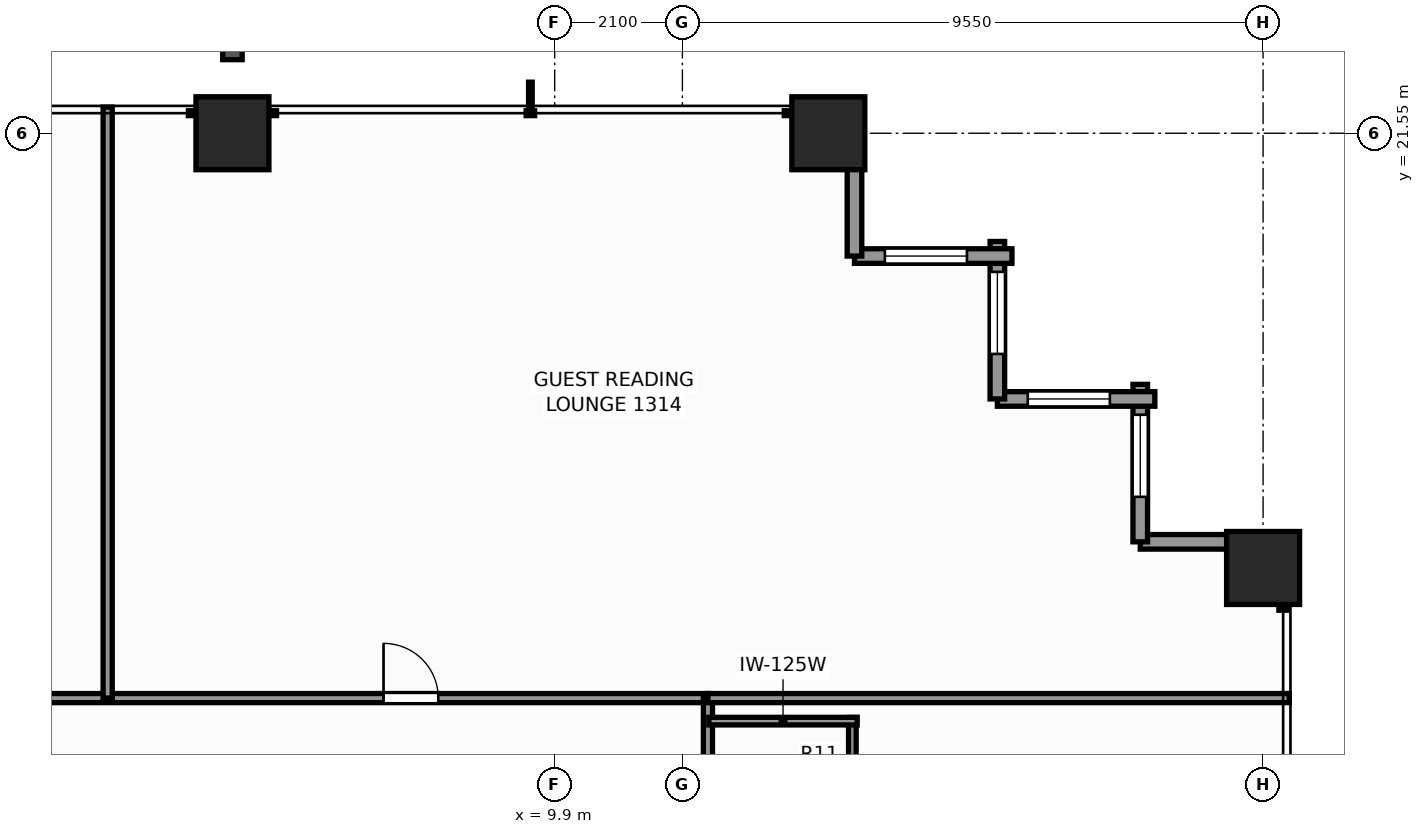
"""IFC4 building model, lengths in metres.
Left out: names, types, materials, properties, quantities, classifications, styles, units other than length and angle.
Written with IfcOpenShell. Run it as: python <this file> out.ifc"""

import sys

from ifc_helpers import new_model, si_unit, direction, frame, frame_2d, origin, origin_2d, place, context, subcontext, project, spatial, rectangle, extrude, element, fill, save


model = new_model("IFC4")
c1 = context("Model", 3, precision=1e-05, world=origin(), true_north=direction((0.0, 1.0)))
c2 = subcontext(c1, "Body", "Model", "MODEL_VIEW")
j1 = project(units=[si_unit("LENGTHUNIT", "METRE"), si_unit("PLANEANGLEUNIT", "RADIAN")], contexts=[c1])
p1 = place(None, origin())
s1 = spatial("IfcSite", under=j1, at=p1, CompositionType="ELEMENT")
p2 = place(p1, origin())
s2 = spatial("IfcBuilding", under=s1, at=p2, CompositionType="ELEMENT")
p3 = place(p2, frame((0.0, 0.0, 46.9)))
s3 = spatial("IfcBuildingStorey", under=s2, at=p3, CompositionType="ELEMENT", Elevation=46.9)
for number, where, z_axis, x_axis in (
    (1, (4.6, 21.55, 0.0), (0.0, 0.0, 1.0), (1.0, 0.0, 0.0)),
    (2, (14.4, 21.55, 0.0), (0.0, 0.0, 1.0), (1.0, 0.0, 0.0)),
    (3, (21.55, 14.4, 0.0), (0.0, 0.0, 1.0), (1.0, 0.0, 0.0)),
):
    element("IfcColumn", number, at=place(p3, frame(where, z_axis=z_axis, x_axis=x_axis)), inside=s3, PredefinedType="COLUMN", context=c2, shape_type="SweptSolid", body=[
        extrude(rectangle(XDim=1.2, YDim=1.2, at=origin_2d()), origin(), (0.0, 0.0, 1.0), 3.3),
    ])
p4 = place(p3, frame((19.53, 14.83, 0.0), z_axis=(0.0, 0.0, 1.0), x_axis=(1.0, 0.0, 0.0)))
e4 = element("IfcWall", 4, at=p4, inside=s3, PredefinedType="STANDARD", context=c2, shape_type="SweptSolid", body=[
    extrude(rectangle(XDim=2.59, YDim=0.24, at=frame_2d((1.295, 0.0))), origin(), (0.0, 0.0, 1.0), 2.439),
])
p5 = place(p3, frame((19.53, 17.42, 0.0), z_axis=(0.0, 0.0, 1.0), x_axis=(0.0, -1.0, 0.0)))
e5 = element("IfcWall", 5, at=p5, inside=s3, PredefinedType="STANDARD", context=c2, shape_type="SweptSolid", body=[
    extrude(rectangle(XDim=2.59, YDim=0.24, at=frame_2d((1.295, 0.0))), origin(), (0.0, 0.0, 1.0), 2.439),
])
p6 = place(p5, frame((0.5, 0.0, 0.65)))
e6 = element("IfcOpeningElement", 6, at=p6, cuts=e5, PredefinedType="OPENING", context=c2, shape_type="SweptSolid", body=[
    extrude(rectangle(XDim=1.35, YDim=1.55, at=frame_2d((0.675, 0.775))), frame((0.0, 0.13, 0.0), z_axis=(0.0, -1.0, 0.0), x_axis=(1.0, 0.0, 0.0)), (0.0, 0.0, 1.0), 0.26),
])
p7 = place(p3, frame((17.18, 17.18, 0.0), z_axis=(0.0, 0.0, 1.0), x_axis=(1.0, 0.0, 0.0)))
e7 = element("IfcWall", 7, at=p7, inside=s3, PredefinedType="STANDARD", context=c2, shape_type="SweptSolid", body=[
    extrude(rectangle(XDim=2.59, YDim=0.24, at=frame_2d((1.295, 0.0))), origin(), (0.0, 0.0, 1.0), 2.439),
])
p8 = place(p7, frame((0.5, 0.0, 0.65)))
e8 = element("IfcOpeningElement", 8, at=p8, cuts=e7, PredefinedType="OPENING", context=c2, shape_type="SweptSolid", body=[
    extrude(rectangle(XDim=1.35, YDim=1.55, at=frame_2d((0.675, 0.775))), frame((0.0, 0.13, 0.0), z_axis=(0.0, -1.0, 0.0), x_axis=(1.0, 0.0, 0.0)), (0.0, 0.0, 1.0), 0.26),
])
p9 = place(p3, frame((17.18, 19.77, 0.0), z_axis=(0.0, 0.0, 1.0), x_axis=(0.0, -1.0, 0.0)))
e9 = element("IfcWall", 9, at=p9, inside=s3, PredefinedType="STANDARD", context=c2, shape_type="SweptSolid", body=[
    extrude(rectangle(XDim=2.59, YDim=0.24, at=frame_2d((1.295, 0.0))), origin(), (0.0, 0.0, 1.0), 2.439),
])
p10 = place(p9, frame((0.5, 0.0, 0.65)))
e10 = element("IfcOpeningElement", 10, at=p10, cuts=e9, PredefinedType="OPENING", context=c2, shape_type="SweptSolid", body=[
    extrude(rectangle(XDim=1.35, YDim=1.55, at=frame_2d((0.675, 0.775))), frame((0.0, 0.13, 0.0), z_axis=(0.0, -1.0, 0.0), x_axis=(1.0, 0.0, 0.0)), (0.0, 0.0, 1.0), 0.26),
])
p11 = place(p3, frame((14.83, 19.53, 0.0), z_axis=(0.0, 0.0, 1.0), x_axis=(1.0, 0.0, 0.0)))
e11 = element("IfcWall", 11, at=p11, inside=s3, PredefinedType="STANDARD", context=c2, shape_type="SweptSolid", body=[
    extrude(rectangle(XDim=2.59, YDim=0.24, at=frame_2d((1.295, 0.0))), origin(), (0.0, 0.0, 1.0), 2.439),
])
p12 = place(p11, frame((0.5, 0.0, 0.65)))
e12 = element("IfcOpeningElement", 12, at=p12, cuts=e11, PredefinedType="OPENING", context=c2, shape_type="SweptSolid", body=[
    extrude(rectangle(XDim=1.35, YDim=1.55, at=frame_2d((0.675, 0.775))), frame((0.0, 0.13, 0.0), z_axis=(0.0, -1.0, 0.0), x_axis=(1.0, 0.0, 0.0)), (0.0, 0.0, 1.0), 0.26),
])
p13 = place(p3, frame((14.83, 22.12, 0.0), z_axis=(0.0, 0.0, 1.0), x_axis=(0.0, -1.0, 0.0)))
e13 = element("IfcWall", 13, at=p13, inside=s3, PredefinedType="STANDARD", context=c2, shape_type="SweptSolid", body=[
    extrude(rectangle(XDim=2.59, YDim=0.24, at=frame_2d((1.295, 0.0))), origin(), (0.0, 0.0, 1.0), 2.439),
])
p14 = place(p3, frame((-12.58, 12.26, 0.0), z_axis=(0.0, 0.0, 1.0), x_axis=(1.0, 0.0, 0.0)))
e14 = element("IfcWall", 14, at=p14, inside=s3, PredefinedType="PARTITIONING", context=c2, shape_type="SweptSolid", body=[
    extrude(rectangle(XDim=25.0, YDim=0.15, at=frame_2d((12.5, 0.0))), origin(), (0.0, 0.0, 1.0), 2.272),
])
p15 = place(p14, frame((3.379, 0.0, 0.0)))
e15 = element("IfcOpeningElement", 15, at=p15, cuts=e14, PredefinedType="OPENING", context=c2, shape_type="SweptSolid", body=[
    extrude(rectangle(XDim=0.9, YDim=2.06, at=frame_2d((0.45, 1.03))), frame((0.0, 0.085, 0.0), z_axis=(0.0, -1.0, 0.0), x_axis=(1.0, 0.0, 0.0)), (0.0, 0.0, 1.0), 0.17),
])
p16 = place(p14, frame((10.1, 0.0, 0.0)))
e16 = element("IfcOpeningElement", 16, at=p16, cuts=e14, PredefinedType="OPENING", context=c2, shape_type="SweptSolid", body=[
    extrude(rectangle(XDim=0.9, YDim=2.06, at=frame_2d((0.45, 1.03))), frame((0.0, 0.085, 0.0), z_axis=(0.0, -1.0, 0.0), x_axis=(1.0, 0.0, 0.0)), (0.0, 0.0, 1.0), 0.17),
])
p17 = place(p14, frame((19.665, 0.0, 0.0)))
e17 = element("IfcOpeningElement", 17, at=p17, cuts=e14, PredefinedType="OPENING", context=c2, shape_type="SweptSolid", body=[
    extrude(rectangle(XDim=0.9, YDim=2.06, at=frame_2d((0.45, 1.03))), frame((0.0, 0.085, 0.0), z_axis=(0.0, -1.0, 0.0), x_axis=(1.0, 0.0, 0.0)), (0.0, 0.0, 1.0), 0.17),
])
p18 = place(p3, frame((12.42, -12.58, 0.0), z_axis=(0.0, 0.0, 1.0), x_axis=(0.0, 1.0, 0.0)))
e18 = element("IfcWall", 18, at=p18, inside=s3, PredefinedType="PARTITIONING", context=c2, shape_type="SweptSolid", body=[
    extrude(rectangle(XDim=24.84, YDim=0.15, at=frame_2d((12.42, 0.0))), origin(), (0.0, 0.0, 1.0), 2.272),
])
p19 = place(p18, frame((4.595, 0.0, 0.0)))
e19 = element("IfcOpeningElement", 19, at=p19, cuts=e18, PredefinedType="OPENING", context=c2, shape_type="SweptSolid", body=[
    extrude(rectangle(XDim=0.9, YDim=2.06, at=frame_2d((0.45, 1.03))), frame((0.0, 0.085, 0.0), z_axis=(0.0, -1.0, 0.0), x_axis=(1.0, 0.0, 0.0)), (0.0, 0.0, 1.0), 0.17),
])
p20 = place(p18, frame((14.16, 0.0, 0.0)))
e20 = element("IfcOpeningElement", 20, at=p20, cuts=e18, PredefinedType="OPENING", context=c2, shape_type="SweptSolid", body=[
    extrude(rectangle(XDim=0.9, YDim=2.06, at=frame_2d((0.45, 1.03))), frame((0.0, 0.085, 0.0), z_axis=(0.0, -1.0, 0.0), x_axis=(1.0, 0.0, 0.0)), (0.0, 0.0, 1.0), 0.17),
])
p21 = place(p18, frame((20.309, 0.0, 0.0)))
e21 = element("IfcOpeningElement", 21, at=p21, cuts=e18, PredefinedType="OPENING", context=c2, shape_type="SweptSolid", body=[
    extrude(rectangle(XDim=0.95, YDim=2.06, at=frame_2d((0.475, 1.03))), frame((0.0, 0.085, 0.0), z_axis=(0.0, -1.0, 0.0), x_axis=(1.0, 0.0, 0.0)), (0.0, 0.0, 1.0), 0.17),
])
p22 = place(p3, frame((12.42, 12.26, 0.0), z_axis=(0.0, 0.0, 1.0), x_axis=(1.0, 0.0, 0.0)))
e22 = element("IfcWall", 22, at=p22, inside=s3, PredefinedType="PARTITIONING", context=c2, shape_type="SweptSolid", body=[
    extrude(rectangle(XDim=9.56, YDim=0.15, at=frame_2d((4.78, 0.0))), origin(), (0.0, 0.0, 1.0), 2.272),
])
p23 = place(p3, frame((14.795, 9.671, 0.0), z_axis=(0.0, 0.0, 1.0), x_axis=(0.0, 1.0, 0.0)))
e23 = element("IfcWall", 23, at=p23, inside=s3, PredefinedType="PARTITIONING", context=c2, shape_type="SweptSolid", body=[
    extrude(rectangle(XDim=2.27, YDim=0.125, at=frame_2d((1.135, 0.0))), origin(), (0.0, 0.0, 1.0), 2.272),
])
p24 = place(p3, frame((12.435, 11.881, 0.0), z_axis=(0.0, 0.0, 1.0), x_axis=(1.0, 0.0, 0.0)))
e24 = element("IfcWall", 24, at=p24, inside=s3, PredefinedType="PARTITIONING", context=c2, shape_type="SweptSolid", body=[
    extrude(rectangle(XDim=2.44, YDim=0.125, at=frame_2d((1.22, 0.0))), origin(), (0.0, 0.0, 1.0), 2.272),
])
p25 = place(p3, frame((2.548, 12.26, 0.0), z_axis=(0.0, 0.0, 1.0), x_axis=(0.0, 1.0, 0.0)))
e25 = element("IfcWall", 25, at=p25, inside=s3, PredefinedType="PARTITIONING", context=c2, shape_type="SweptSolid", body=[
    extrude(rectangle(XDim=9.72, YDim=0.15, at=frame_2d((4.86, 0.0))), origin(), (0.0, 0.0, 1.0), 2.429),
])
p26 = place(p6, origin())
e26 = element("IfcWindow", 26, at=p26, inside=s3, PartitioningType="SINGLE_PANEL", PredefinedType="WINDOW", context=c2, shape_type="SweptSolid", body=[
    extrude(rectangle(XDim=1.35, YDim=1.55, at=frame_2d((0.675, 0.775))), frame((0.0, 0.03, 0.0), z_axis=(0.0, -1.0, 0.0), x_axis=(1.0, 0.0, 0.0)), (0.0, 0.0, 1.0), 0.06),
])
fill(e6, e26)
p27 = place(p8, origin())
e27 = element("IfcWindow", 27, at=p27, inside=s3, PartitioningType="SINGLE_PANEL", PredefinedType="WINDOW", context=c2, shape_type="SweptSolid", body=[
    extrude(rectangle(XDim=1.35, YDim=1.55, at=frame_2d((0.675, 0.775))), frame((0.0, 0.03, 0.0), z_axis=(0.0, -1.0, 0.0), x_axis=(1.0, 0.0, 0.0)), (0.0, 0.0, 1.0), 0.06),
])
fill(e8, e27)
p28 = place(p10, origin())
e28 = element("IfcWindow", 28, at=p28, inside=s3, PartitioningType="SINGLE_PANEL", PredefinedType="WINDOW", context=c2, shape_type="SweptSolid", body=[
    extrude(rectangle(XDim=1.35, YDim=1.55, at=frame_2d((0.675, 0.775))), frame((0.0, 0.03, 0.0), z_axis=(0.0, -1.0, 0.0), x_axis=(1.0, 0.0, 0.0)), (0.0, 0.0, 1.0), 0.06),
])
fill(e10, e28)
p29 = place(p12, origin())
e29 = element("IfcWindow", 29, at=p29, inside=s3, PartitioningType="SINGLE_PANEL", PredefinedType="WINDOW", context=c2, shape_type="SweptSolid", body=[
    extrude(rectangle(XDim=1.35, YDim=1.55, at=frame_2d((0.675, 0.775))), frame((0.0, 0.03, 0.0), z_axis=(0.0, -1.0, 0.0), x_axis=(1.0, 0.0, 0.0)), (0.0, 0.0, 1.0), 0.06),
])
fill(e12, e29)
p30 = place(p17, origin())
e30 = element("IfcDoor", 30, at=p30, inside=s3, OperationType="SINGLE_SWING_LEFT", PredefinedType="DOOR", context=c2, shape_type="SweptSolid", body=[
    extrude(rectangle(XDim=0.9, YDim=2.06, at=frame_2d((0.45, 1.03))), frame((0.0, 0.025, 0.0), z_axis=(0.0, -1.0, 0.0), x_axis=(1.0, 0.0, 0.0)), (0.0, 0.0, 1.0), 0.05),
])
fill(e17, e30)
save(model, sys.argv[1])
